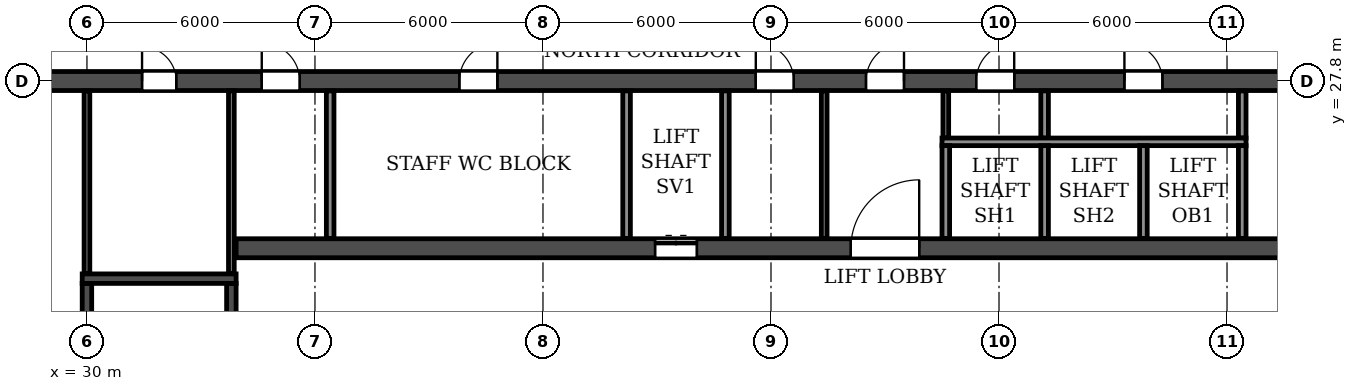
"""IFC4 building model, lengths in metres.
Left out: names, types, materials, properties, quantities, classifications, styles, units other than length and angle.
Written with IfcOpenShell. Run it as: python <this file> out.ifc"""

import sys

from ifc_helpers import new_model, si_unit, direction, frame, frame_2d, origin, place, context, subcontext, project, spatial, rectangle, extrude, element, fill, save


model = new_model("IFC4")
c1 = context("Model", 3, precision=1e-05, world=origin(), true_north=direction((0.0, 1.0)))
c2 = subcontext(c1, "Body", "Model", "MODEL_VIEW")
j1 = project(units=[si_unit("LENGTHUNIT", "METRE"), si_unit("PLANEANGLEUNIT", "RADIAN")], contexts=[c1])
p1 = place(None, origin())
s1 = spatial("IfcSite", under=j1, at=p1, CompositionType="ELEMENT")
p2 = place(p1, origin())
s2 = spatial("IfcBuilding", under=s1, at=p2, CompositionType="ELEMENT")
p3 = place(p2, frame((0.0, 0.0, 72.9)))
s3 = spatial("IfcBuildingStorey", under=s2, at=p3, CompositionType="ELEMENT", Elevation=72.9)
p4 = place(p3, frame((8.6, 27.8, 0.0), z_axis=(0.0, 0.0, 1.0), x_axis=(1.0, 0.0, 0.0)))
e1 = element("IfcWall", 1, at=p4, inside=s3, PredefinedType="SOLIDWALL", context=c2, shape_type="SweptSolid", body=[
    extrude(rectangle(XDim=84.8, YDim=0.5, at=frame_2d((42.4, 0.0))), origin(), (0.0, 0.0, 1.0), 3.06),
])
p5 = place(p4, frame((2.0, 0.0, 0.0)))
e2 = element("IfcOpeningElement", 2, at=p5, cuts=e1, PredefinedType="OPENING", context=c2, shape_type="SweptSolid", body=[
    extrude(rectangle(XDim=1.5, YDim=2.1, at=frame_2d((0.75, 1.05))), frame((0.0, 0.26, 0.0), z_axis=(0.0, -1.0, 0.0), x_axis=(1.0, 0.0, 0.0)), (0.0, 0.0, 1.0), 0.52),
])
p6 = place(p4, frame((6.95, 0.0, 0.0)))
e3 = element("IfcOpeningElement", 3, at=p6, cuts=e1, PredefinedType="OPENING", context=c2, shape_type="SweptSolid", body=[
    extrude(rectangle(XDim=1.0, YDim=2.1, at=frame_2d((0.5, 1.05))), frame((0.0, 0.26, 0.0), z_axis=(0.0, -1.0, 0.0), x_axis=(1.0, 0.0, 0.0)), (0.0, 0.0, 1.0), 0.52),
])
p7 = place(p4, frame((10.3, 0.0, 0.0)))
e4 = element("IfcOpeningElement", 4, at=p7, cuts=e1, PredefinedType="OPENING", context=c2, shape_type="SweptSolid", body=[
    extrude(rectangle(XDim=1.0, YDim=2.1, at=frame_2d((0.5, 1.05))), frame((0.0, 0.26, 0.0), z_axis=(0.0, -1.0, 0.0), x_axis=(1.0, 0.0, 0.0)), (0.0, 0.0, 1.0), 0.52),
])
p8 = place(p4, frame((13.65, 0.0, 0.0)))
e5 = element("IfcOpeningElement", 5, at=p8, cuts=e1, PredefinedType="OPENING", context=c2, shape_type="SweptSolid", body=[
    extrude(rectangle(XDim=0.9, YDim=2.1, at=frame_2d((0.45, 1.05))), frame((0.0, 0.26, 0.0), z_axis=(0.0, -1.0, 0.0), x_axis=(1.0, 0.0, 0.0)), (0.0, 0.0, 1.0), 0.52),
])
p9 = place(p4, frame((22.85, 0.0, 0.0)))
e6 = element("IfcOpeningElement", 6, at=p9, cuts=e1, PredefinedType="OPENING", context=c2, shape_type="SweptSolid", body=[
    extrude(rectangle(XDim=0.9, YDim=2.1, at=frame_2d((0.45, 1.05))), frame((0.0, 0.26, 0.0), z_axis=(0.0, -1.0, 0.0), x_axis=(1.0, 0.0, 0.0)), (0.0, 0.0, 1.0), 0.52),
])
p10 = place(p4, frame((26.0, 0.0, 0.0)))
e7 = element("IfcOpeningElement", 7, at=p10, cuts=e1, PredefinedType="OPENING", context=c2, shape_type="SweptSolid", body=[
    extrude(rectangle(XDim=1.0, YDim=2.1, at=frame_2d((0.5, 1.05))), frame((0.0, 0.26, 0.0), z_axis=(0.0, -1.0, 0.0), x_axis=(1.0, 0.0, 0.0)), (0.0, 0.0, 1.0), 0.52),
])
p11 = place(p4, frame((31.2, 0.0, 0.0)))
e8 = element("IfcOpeningElement", 8, at=p11, cuts=e1, PredefinedType="OPENING", context=c2, shape_type="SweptSolid", body=[
    extrude(rectangle(XDim=1.0, YDim=2.1, at=frame_2d((0.5, 1.05))), frame((0.0, 0.26, 0.0), z_axis=(0.0, -1.0, 0.0), x_axis=(1.0, 0.0, 0.0)), (0.0, 0.0, 1.0), 0.52),
])
p12 = place(p4, frame((39.0, 0.0, 0.0)))
e9 = element("IfcOpeningElement", 9, at=p12, cuts=e1, PredefinedType="OPENING", context=c2, shape_type="SweptSolid", body=[
    extrude(rectangle(XDim=1.0, YDim=2.1, at=frame_2d((0.5, 1.05))), frame((0.0, 0.26, 0.0), z_axis=(0.0, -1.0, 0.0), x_axis=(1.0, 0.0, 0.0)), (0.0, 0.0, 1.0), 0.52),
])
p13 = place(p4, frame((41.9, 0.0, 0.0)))
e10 = element("IfcOpeningElement", 10, at=p13, cuts=e1, PredefinedType="OPENING", context=c2, shape_type="SweptSolid", body=[
    extrude(rectangle(XDim=1.0, YDim=2.1, at=frame_2d((0.5, 1.05))), frame((0.0, 0.26, 0.0), z_axis=(0.0, -1.0, 0.0), x_axis=(1.0, 0.0, 0.0)), (0.0, 0.0, 1.0), 0.52),
])
p14 = place(p4, frame((44.8, 0.0, 0.0)))
e11 = element("IfcOpeningElement", 11, at=p14, cuts=e1, PredefinedType="OPENING", context=c2, shape_type="SweptSolid", body=[
    extrude(rectangle(XDim=1.0, YDim=2.1, at=frame_2d((0.5, 1.05))), frame((0.0, 0.26, 0.0), z_axis=(0.0, -1.0, 0.0), x_axis=(1.0, 0.0, 0.0)), (0.0, 0.0, 1.0), 0.52),
])
p15 = place(p4, frame((48.7, 0.0, 0.0)))
e12 = element("IfcOpeningElement", 12, at=p15, cuts=e1, PredefinedType="OPENING", context=c2, shape_type="SweptSolid", body=[
    extrude(rectangle(XDim=1.0, YDim=2.1, at=frame_2d((0.5, 1.05))), frame((0.0, 0.26, 0.0), z_axis=(0.0, -1.0, 0.0), x_axis=(1.0, 0.0, 0.0)), (0.0, 0.0, 1.0), 0.52),
])
p16 = place(p4, frame((55.2, 0.0, 0.0)))
e13 = element("IfcOpeningElement", 13, at=p16, cuts=e1, PredefinedType="OPENING", context=c2, shape_type="SweptSolid", body=[
    extrude(rectangle(XDim=1.0, YDim=2.1, at=frame_2d((0.5, 1.05))), frame((0.0, 0.26, 0.0), z_axis=(0.0, -1.0, 0.0), x_axis=(1.0, 0.0, 0.0)), (0.0, 0.0, 1.0), 0.52),
])
p17 = place(p4, frame((61.05, 0.0, 0.0)))
e14 = element("IfcOpeningElement", 14, at=p17, cuts=e1, PredefinedType="OPENING", context=c2, shape_type="SweptSolid", body=[
    extrude(rectangle(XDim=0.9, YDim=2.1, at=frame_2d((0.45, 1.05))), frame((0.0, 0.26, 0.0), z_axis=(0.0, -1.0, 0.0), x_axis=(1.0, 0.0, 0.0)), (0.0, 0.0, 1.0), 0.52),
])
p18 = place(p4, frame((70.25, 0.0, 0.0)))
e15 = element("IfcOpeningElement", 15, at=p18, cuts=e1, PredefinedType="OPENING", context=c2, shape_type="SweptSolid", body=[
    extrude(rectangle(XDim=0.9, YDim=2.1, at=frame_2d((0.45, 1.05))), frame((0.0, 0.26, 0.0), z_axis=(0.0, -1.0, 0.0), x_axis=(1.0, 0.0, 0.0)), (0.0, 0.0, 1.0), 0.52),
])
p19 = place(p4, frame((73.5, 0.0, 0.0)))
e16 = element("IfcOpeningElement", 16, at=p19, cuts=e1, PredefinedType="OPENING", context=c2, shape_type="SweptSolid", body=[
    extrude(rectangle(XDim=1.0, YDim=2.1, at=frame_2d((0.5, 1.05))), frame((0.0, 0.26, 0.0), z_axis=(0.0, -1.0, 0.0), x_axis=(1.0, 0.0, 0.0)), (0.0, 0.0, 1.0), 0.52),
])
p20 = place(p4, frame((76.25, 0.0, 0.0)))
e17 = element("IfcOpeningElement", 17, at=p20, cuts=e1, PredefinedType="OPENING", context=c2, shape_type="SweptSolid", body=[
    extrude(rectangle(XDim=1.0, YDim=2.1, at=frame_2d((0.5, 1.05))), frame((0.0, 0.26, 0.0), z_axis=(0.0, -1.0, 0.0), x_axis=(1.0, 0.0, 0.0)), (0.0, 0.0, 1.0), 0.52),
])
p21 = place(p4, frame((80.95, 0.0, 0.0)))
e18 = element("IfcOpeningElement", 18, at=p21, cuts=e1, PredefinedType="OPENING", context=c2, shape_type="SweptSolid", body=[
    extrude(rectangle(XDim=1.0, YDim=2.1, at=frame_2d((0.5, 1.05))), frame((0.0, 0.26, 0.0), z_axis=(0.0, -1.0, 0.0), x_axis=(1.0, 0.0, 0.0)), (0.0, 0.0, 1.0), 0.52),
])
p22 = place(p3, frame((33.925, 23.4, 0.0), z_axis=(0.0, 0.0, 1.0), x_axis=(1.0, 0.0, 0.0)))
e19 = element("IfcWall", 19, at=p22, inside=s3, PredefinedType="SOLIDWALL", context=c2, shape_type="SweptSolid", body=[
    extrude(rectangle(XDim=34.15, YDim=0.5, at=frame_2d((17.075, 0.0))), origin(), (0.0, 0.0, 1.0), 3.06),
])
p23 = place(p22, frame((16.175, 0.0, 0.0)))
e20 = element("IfcOpeningElement", 20, at=p23, cuts=e19, PredefinedType="OPENING", context=c2, shape_type="SweptSolid", body=[
    extrude(rectangle(XDim=1.8, YDim=2.1, at=frame_2d((0.9, 1.05))), frame((0.0, 0.26, 0.0), z_axis=(0.0, -1.0, 0.0), x_axis=(1.0, 0.0, 0.0)), (0.0, 0.0, 1.0), 0.52),
])
p24 = place(p22, frame((11.025, 0.0, 0.0)))
e21 = element("IfcOpeningElement", 21, at=p24, cuts=e19, PredefinedType="OPENING", context=c2, shape_type="SweptSolid", body=[
    extrude(rectangle(XDim=1.1, YDim=2.1, at=frame_2d((0.55, 1.05))), frame((0.0, 0.26, 0.0), z_axis=(0.0, -1.0, 0.0), x_axis=(1.0, 0.0, 0.0)), (0.0, 0.0, 1.0), 0.52),
])
p25 = place(p3, frame((30.0, 14.85, 0.0), z_axis=(0.0, 0.0, 1.0), x_axis=(0.0, 1.0, 0.0)))
e22 = element("IfcWall", 22, at=p25, inside=s3, PredefinedType="SOLIDWALL", context=c2, shape_type="SweptSolid", body=[
    extrude(rectangle(XDim=7.625, YDim=0.25, at=frame_2d((3.812, 0.0))), origin(), (0.0, 0.0, 1.0), 3.06),
])
p26 = place(p3, frame((33.8, 14.85, 0.0), z_axis=(0.0, 0.0, 1.0), x_axis=(0.0, 1.0, 0.0)))
e23 = element("IfcWall", 23, at=p26, inside=s3, PredefinedType="SOLIDWALL", context=c2, shape_type="SweptSolid", body=[
    extrude(rectangle(XDim=7.625, YDim=0.25, at=frame_2d((3.812, 0.0))), origin(), (0.0, 0.0, 1.0), 3.06),
])
p27 = place(p26, frame((0.45, 0.0, 0.0)))
e24 = element("IfcOpeningElement", 24, at=p27, cuts=e23, PredefinedType="OPENING", context=c2, shape_type="SweptSolid", body=[
    extrude(rectangle(XDim=1.0, YDim=2.1, at=frame_2d((0.5, 1.05))), frame((0.0, 0.135, 0.0), z_axis=(0.0, -1.0, 0.0), x_axis=(1.0, 0.0, 0.0)), (0.0, 0.0, 1.0), 0.27),
])
p28 = place(p3, frame((29.875, 22.6, 0.0), z_axis=(0.0, 0.0, 1.0), x_axis=(1.0, 0.0, 0.0)))
e25 = element("IfcWall", 25, at=p28, inside=s3, PredefinedType="SOLIDWALL", context=c2, shape_type="SweptSolid", body=[
    extrude(rectangle(XDim=4.05, YDim=0.25, at=frame_2d((2.025, 0.0))), origin(), (0.0, 0.0, 1.0), 3.06),
])
p29 = place(p3, frame((49.4, 23.66, 0.0), z_axis=(0.0, 0.0, 1.0), x_axis=(0.0, 1.0, 0.0)))
e26 = element("IfcWall", 26, at=p29, inside=s3, PredefinedType="PARTITIONING", context=c2, shape_type="SweptSolid", body=[
    extrude(rectangle(XDim=3.88, YDim=0.15, at=frame_2d((1.94, 0.0))), origin(), (0.0, 0.0, 1.0), 3.06),
])
p30 = place(p3, frame((52.6, 26.3, 0.0), z_axis=(0.0, 0.0, 1.0), x_axis=(0.0, 1.0, 0.0)))
e27 = element("IfcWall", 27, at=p30, inside=s3, PredefinedType="PARTITIONING", context=c2, shape_type="SweptSolid", body=[
    extrude(rectangle(XDim=1.24, YDim=0.15, at=frame_2d((0.62, 0.0))), origin(), (0.0, 0.0, 1.0), 3.06),
])
p31 = place(p3, frame((36.4, 23.66, 0.0), z_axis=(0.0, 0.0, 1.0), x_axis=(0.0, 1.0, 0.0)))
e28 = element("IfcWall", 28, at=p31, inside=s3, PredefinedType="PARTITIONING", context=c2, shape_type="SweptSolid", body=[
    extrude(rectangle(XDim=3.88, YDim=0.2, at=frame_2d((1.94, 0.0))), origin(), (0.0, 0.0, 1.0), 3.06),
])
for number, where, z_axis, x_axis in (
    (29, (55.2, 26.3, 0.0), (0.0, 0.0, 1.0), (0.0, 1.0, 0.0)),
    (30, (60.4, 26.3, 0.0), (0.0, 0.0, 1.0), (0.0, 1.0, 0.0)),
):
    element("IfcWall", number, at=place(p3, frame(where, z_axis=z_axis, x_axis=x_axis)), inside=s3, PredefinedType="PARTITIONING", context=c2, shape_type="SweptSolid", body=[
        extrude(rectangle(XDim=1.24, YDim=0.2, at=frame_2d((0.62, 0.0))), origin(), (0.0, 0.0, 1.0), 3.06),
    ])
for number, where, z_axis, x_axis in (
    (31, (30.0, 22.735, 0.0), (0.0, 0.0, 1.0), (0.0, 1.0, 0.0)),
    (32, (33.8, 22.735, 0.0), (0.0, 0.0, 1.0), (0.0, 1.0, 0.0)),
):
    element("IfcWall", number, at=place(p3, frame(where, z_axis=z_axis, x_axis=x_axis)), inside=s3, PredefinedType="PARTITIONING", context=c2, shape_type="SweptSolid", body=[
        extrude(rectangle(XDim=4.805, YDim=0.15, at=frame_2d((2.402, 0.0))), origin(), (0.0, 0.0, 1.0), 3.06),
    ])
p32 = place(p3, frame((52.5, 26.2, 0.0), z_axis=(0.0, 0.0, 1.0), x_axis=(1.0, 0.0, 0.0)))
e33 = element("IfcWall", 33, at=p32, inside=s3, PredefinedType="PARTITIONING", context=c2, shape_type="SweptSolid", body=[
    extrude(rectangle(XDim=8.0, YDim=0.2, at=frame_2d((4.0, 0.0))), origin(), (0.0, 0.0, 1.0), 3.06),
])
for number, where, z_axis, x_axis in (
    (34, (44.2, 23.66, 0.0), (0.0, 0.0, 1.0), (0.0, 1.0, 0.0)),
    (35, (46.8, 23.66, 0.0), (0.0, 0.0, 1.0), (0.0, 1.0, 0.0)),
):
    element("IfcWall", number, at=place(p3, frame(where, z_axis=z_axis, x_axis=x_axis)), inside=s3, PredefinedType="PARTITIONING", context=c2, shape_type="SweptSolid", body=[
        extrude(rectangle(XDim=3.88, YDim=0.2, at=frame_2d((1.94, 0.0))), origin(), (0.0, 0.0, 1.0), 3.06),
    ])
for number, where, z_axis, x_axis in (
    (36, (52.6, 23.66, 0.0), (0.0, 0.0, 1.0), (0.0, 1.0, 0.0)),
    (37, (55.2, 23.66, 0.0), (0.0, 0.0, 1.0), (0.0, 1.0, 0.0)),
    (38, (57.8, 23.66, 0.0), (0.0, 0.0, 1.0), (0.0, 1.0, 0.0)),
    (39, (60.4, 23.66, 0.0), (0.0, 0.0, 1.0), (0.0, 1.0, 0.0)),
):
    element("IfcWall", number, at=place(p3, frame(where, z_axis=z_axis, x_axis=x_axis)), inside=s3, PredefinedType="PARTITIONING", context=c2, shape_type="SweptSolid", body=[
        extrude(rectangle(XDim=2.44, YDim=0.2, at=frame_2d((1.22, 0.0))), origin(), (0.0, 0.0, 1.0), 3.06),
    ])
p33 = place(p9, origin())
e40 = element("IfcDoor", 40, at=p33, inside=s3, OperationType="SINGLE_SWING_LEFT", PredefinedType="DOOR", context=c2, shape_type="SweptSolid", body=[
    extrude(rectangle(XDim=0.9, YDim=2.1, at=frame_2d((0.45, 1.05))), frame((0.0, 0.025, 0.0), z_axis=(0.0, -1.0, 0.0), x_axis=(1.0, 0.0, 0.0)), (0.0, 0.0, 1.0), 0.05),
])
fill(e6, e40)
p34 = place(p10, origin())
e41 = element("IfcDoor", 41, at=p34, inside=s3, OperationType="SINGLE_SWING_LEFT", PredefinedType="DOOR", context=c2, shape_type="SweptSolid", body=[
    extrude(rectangle(XDim=1.0, YDim=2.1, at=frame_2d((0.5, 1.05))), frame((0.0, 0.025, 0.0), z_axis=(0.0, -1.0, 0.0), x_axis=(1.0, 0.0, 0.0)), (0.0, 0.0, 1.0), 0.05),
])
fill(e7, e41)
p35 = place(p11, origin())
e42 = element("IfcDoor", 42, at=p35, inside=s3, OperationType="SINGLE_SWING_RIGHT", PredefinedType="DOOR", context=c2, shape_type="SweptSolid", body=[
    extrude(rectangle(XDim=1.0, YDim=2.1, at=frame_2d((0.5, 1.05))), frame((0.0, 0.025, 0.0), z_axis=(0.0, -1.0, 0.0), x_axis=(1.0, 0.0, 0.0)), (0.0, 0.0, 1.0), 0.05),
])
fill(e8, e42)
p36 = place(p12, origin())
e43 = element("IfcDoor", 43, at=p36, inside=s3, OperationType="SINGLE_SWING_LEFT", PredefinedType="DOOR", context=c2, shape_type="SweptSolid", body=[
    extrude(rectangle(XDim=1.0, YDim=2.1, at=frame_2d((0.5, 1.05))), frame((0.0, 0.025, 0.0), z_axis=(0.0, -1.0, 0.0), x_axis=(1.0, 0.0, 0.0)), (0.0, 0.0, 1.0), 0.05),
])
fill(e9, e43)
p37 = place(p13, origin())
e44 = element("IfcDoor", 44, at=p37, inside=s3, OperationType="SINGLE_SWING_RIGHT", PredefinedType="DOOR", context=c2, shape_type="SweptSolid", body=[
    extrude(rectangle(XDim=1.0, YDim=2.1, at=frame_2d((0.5, 1.05))), frame((0.0, 0.025, 0.0), z_axis=(0.0, -1.0, 0.0), x_axis=(1.0, 0.0, 0.0)), (0.0, 0.0, 1.0), 0.05),
])
fill(e10, e44)
p38 = place(p14, origin())
e45 = element("IfcDoor", 45, at=p38, inside=s3, OperationType="SINGLE_SWING_RIGHT", PredefinedType="DOOR", context=c2, shape_type="SweptSolid", body=[
    extrude(rectangle(XDim=1.0, YDim=2.1, at=frame_2d((0.5, 1.05))), frame((0.0, 0.025, 0.0), z_axis=(0.0, -1.0, 0.0), x_axis=(1.0, 0.0, 0.0)), (0.0, 0.0, 1.0), 0.05),
])
fill(e11, e45)
p39 = place(p15, origin())
e46 = element("IfcDoor", 46, at=p39, inside=s3, OperationType="SINGLE_SWING_LEFT", PredefinedType="DOOR", context=c2, shape_type="SweptSolid", body=[
    extrude(rectangle(XDim=1.0, YDim=2.1, at=frame_2d((0.5, 1.05))), frame((0.0, 0.025, 0.0), z_axis=(0.0, -1.0, 0.0), x_axis=(1.0, 0.0, 0.0)), (0.0, 0.0, 1.0), 0.05),
])
fill(e12, e46)
p40 = place(p23, origin())
e47 = element("IfcDoor", 47, at=p40, inside=s3, OperationType="DOUBLE_DOOR_SINGLE_SWING", PredefinedType="DOOR", context=c2, shape_type="SweptSolid", body=[
    extrude(rectangle(XDim=1.8, YDim=2.1, at=frame_2d((0.9, 1.05))), frame((0.0, 0.025, 0.0), z_axis=(0.0, -1.0, 0.0), x_axis=(1.0, 0.0, 0.0)), (0.0, 0.0, 1.0), 0.05),
])
fill(e20, e47)
p41 = place(p24, origin())
e48 = element("IfcDoor", 48, at=p41, inside=s3, OperationType="DOUBLE_DOOR_SLIDING", PredefinedType="DOOR", context=c2, shape_type="SweptSolid", body=[
    extrude(rectangle(XDim=1.1, YDim=2.1, at=frame_2d((0.55, 1.05))), frame((0.0, 0.025, 0.0), z_axis=(0.0, -1.0, 0.0), x_axis=(1.0, 0.0, 0.0)), (0.0, 0.0, 1.0), 0.05),
])
fill(e21, e48)
save(model, sys.argv[1])
